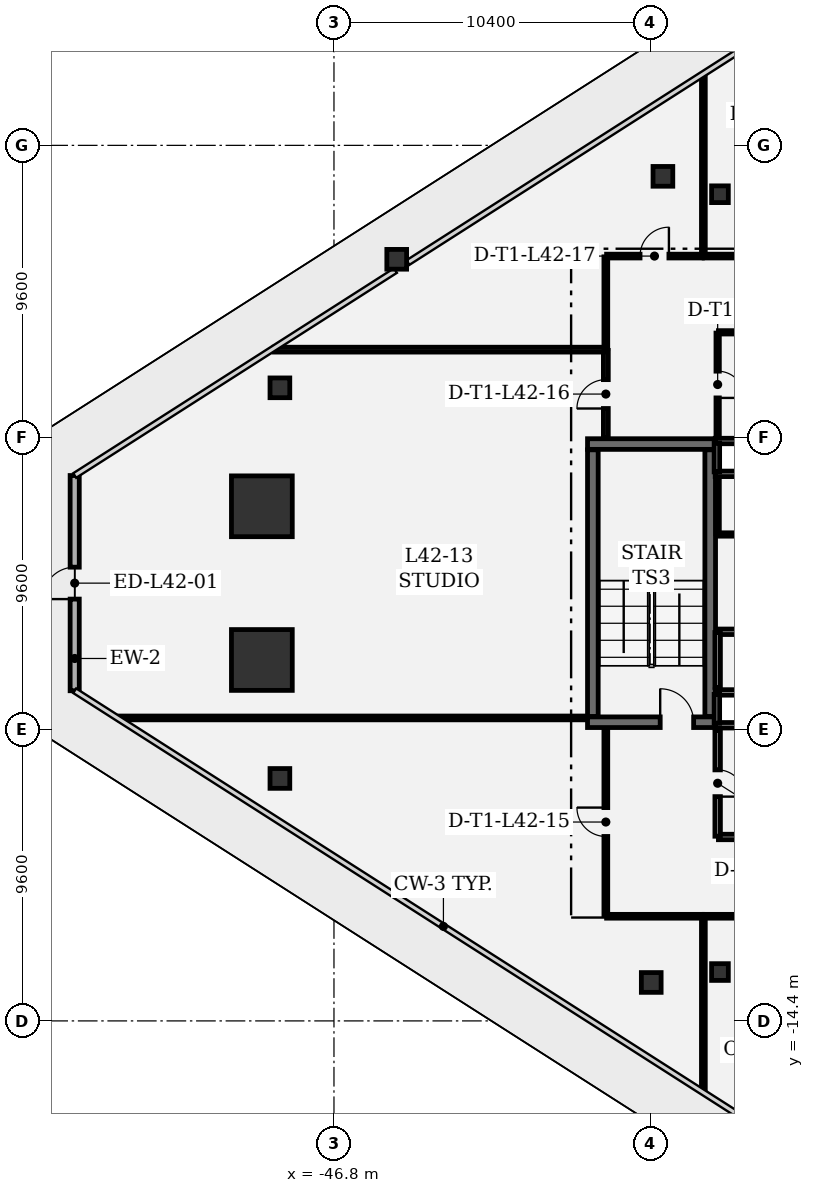
"""IFC4 building model, lengths in metres.
Left out: names, types, materials, properties, quantities, classifications, styles, units other than length and angle.
Written with IfcOpenShell. Run it as: python <this file> out.ifc"""

import sys

from ifc_helpers import new_model, si_unit, direction, frame, frame_2d, origin, origin_2d, place, context, subcontext, project, spatial, rectangle, extrude, element, fill, save


model = new_model("IFC4")
c1 = context("Model", 3, precision=1e-05, world=origin(), true_north=direction((0.0, 1.0)))
c2 = subcontext(c1, "Body", "Model", "MODEL_VIEW")
j1 = project(units=[si_unit("LENGTHUNIT", "METRE"), si_unit("PLANEANGLEUNIT", "RADIAN")], contexts=[c1])
p1 = place(None, origin())
s1 = spatial("IfcSite", under=j1, at=p1, CompositionType="ELEMENT")
p2 = place(p1, origin())
s2 = spatial("IfcBuilding", under=s1, at=p2, CompositionType="ELEMENT")
p3 = place(p2, frame((0.0, 0.0, 184.8)))
s3 = spatial("IfcBuildingStorey", under=s2, at=p3, CompositionType="ELEMENT", Elevation=184.8)
for number, where, z_axis, x_axis in (
    (1, (-49.172, 2.528, 0.0), (0.0, 0.0, 1.0), (1.0, 0.0, 0.0)),
    (2, (-49.172, -2.528, 0.0), (0.0, 0.0, 1.0), (1.0, 0.0, 0.0)),
):
    element("IfcColumn", number, at=place(p3, frame(where, z_axis=z_axis, x_axis=x_axis)), inside=s3, PredefinedType="COLUMN", context=c2, shape_type="SweptSolid", body=[
        extrude(rectangle(XDim=2.0, YDim=2.0, at=origin_2d()), origin(), (0.0, 0.0, 1.0), 4.05),
    ])
for number, where, z_axis, x_axis in (
    (3, (-44.736, 10.652, 0.0), (0.0, 0.0, 1.0), (1.0, 0.0, 0.0)),
    (4, (-48.578, 6.425, 0.0), (0.0, 0.0, 1.0), (1.0, 0.0, 0.0)),
    (5, (-48.578, -6.425, 0.0), (0.0, 0.0, 1.0), (1.0, 0.0, 0.0)),
    (6, (-35.981, 13.381, 0.0), (0.0, 0.0, 1.0), (1.0, 0.0, 0.0)),
    (7, (-36.365, -13.135, 0.0), (0.0, 0.0, 1.0), (1.0, 0.0, 0.0)),
):
    element("IfcColumn", number, at=place(p3, frame(where, z_axis=z_axis, x_axis=x_axis)), inside=s3, PredefinedType="COLUMN", context=c2, shape_type="SweptSolid", body=[
        extrude(rectangle(XDim=0.65, YDim=0.65, at=origin_2d()), origin(), (0.0, 0.0, 1.0), 4.05),
    ])
for number, where, z_axis, x_axis in (
    (8, (-34.104, 12.792, 0.0), (0.0, 0.0, 1.0), (1.0, 0.0, 0.0)),
    (9, (-34.104, -12.792, 0.0), (0.0, 0.0, 1.0), (1.0, 0.0, 0.0)),
):
    element("IfcColumn", number, at=place(p3, frame(where, z_axis=z_axis, x_axis=x_axis)), inside=s3, PredefinedType="COLUMN", context=c2, shape_type="SweptSolid", body=[
        extrude(rectangle(XDim=0.55, YDim=0.55, at=origin_2d()), origin(), (0.0, 0.0, 1.0), 4.05),
    ])
p4 = place(p3, frame((-55.328, -3.54, 0.0), z_axis=(0.0, 0.0, 1.0), x_axis=(0.0, 1.0, 0.0)))
e10 = element("IfcWall", 10, at=p4, inside=s3, PredefinedType="SOLIDWALL", context=c2, shape_type="SweptSolid", body=[
    extrude(rectangle(XDim=7.079, YDim=0.3, at=frame_2d((3.54, 0.0))), origin(), (0.0, 0.0, 1.0), 3.78),
])
p5 = place(p4, frame((3.015, 0.0, 0.0)))
e11 = element("IfcOpeningElement", 11, at=p5, cuts=e10, PredefinedType="OPENING", context=c2, shape_type="SweptSolid", body=[
    extrude(rectangle(XDim=1.05, YDim=2.2, at=frame_2d((0.525, 1.1))), frame((0.0, 0.16, 0.0), z_axis=(0.0, -1.0, 0.0), x_axis=(1.0, 0.0, 0.0)), (0.0, 0.0, 1.0), 0.32),
])
p6 = place(p3, frame((-38.46, -4.575, 0.0), z_axis=(0.0, 0.0, 1.0), x_axis=(1.0, 0.0, 0.0)))
e12 = element("IfcWall", 12, at=p6, inside=s3, PredefinedType="SHEAR", context=c2, shape_type="SweptSolid", body=[
    extrude(rectangle(XDim=4.21, YDim=0.35, at=frame_2d((2.105, 0.0))), origin(), (0.0, 0.0, 1.0), 3.78),
])
p7 = place(p6, frame((2.39, 0.0, 0.0)))
e13 = element("IfcOpeningElement", 13, at=p7, cuts=e12, PredefinedType="OPENING", context=c2, shape_type="SweptSolid", body=[
    extrude(rectangle(XDim=1.1, YDim=2.2, at=frame_2d((0.55, 1.1))), frame((0.0, 0.185, 0.0), z_axis=(0.0, -1.0, 0.0), x_axis=(1.0, 0.0, 0.0)), (0.0, 0.0, 1.0), 0.37),
])
p8 = place(p3, frame((-34.25, 4.575, 0.0), z_axis=(0.0, 0.0, 1.0), x_axis=(-1.0, 0.0, 0.0)))
e14 = element("IfcWall", 14, at=p8, inside=s3, PredefinedType="SHEAR", context=c2, shape_type="SweptSolid", body=[
    extrude(rectangle(XDim=4.21, YDim=0.35, at=frame_2d((2.105, 0.0))), origin(), (0.0, 0.0, 1.0), 3.78),
])
for number, where, z_axis, x_axis in (
    (15, (-34.425, -4.385, 0.0), (0.0, 0.0, 1.0), (0.0, 1.0, 0.0)),
    (16, (-38.285, 4.385, 0.0), (0.0, 0.0, 1.0), (0.0, -1.0, 0.0)),
):
    element("IfcWall", number, at=place(p3, frame(where, z_axis=z_axis, x_axis=x_axis)), inside=s3, PredefinedType="SHEAR", context=c2, shape_type="SweptSolid", body=[
        extrude(rectangle(XDim=8.77, YDim=0.35, at=frame_2d((4.385, 0.0))), origin(), (0.0, 0.0, 1.0), 3.78),
    ])
for number, where, z_axis, x_axis in (
    (17, (-32.99, 3.595, 0.0), (0.0, 0.0, 1.0), (-1.0, 0.0, 0.0)),
    (18, (-34.26, 4.675, 0.0), (0.0, 0.0, 1.0), (1.0, 0.0, 0.0)),
):
    element("IfcWall", number, at=place(p3, frame(where, z_axis=z_axis, x_axis=x_axis)), inside=s3, PredefinedType="PARTITIONING", context=c2, shape_type="SweptSolid", body=[
        extrude(rectangle(XDim=1.27, YDim=0.18, at=frame_2d((0.635, 0.0))), origin(), (0.0, 0.0, 1.0), 3.78),
    ])
p9 = place(p3, frame((-34.205, 3.66, 0.0), z_axis=(0.0, 0.0, 1.0), x_axis=(0.0, 1.0, 0.0)))
e19 = element("IfcWall", 19, at=p9, inside=s3, PredefinedType="PARTITIONING", context=c2, shape_type="SweptSolid", body=[
    extrude(rectangle(XDim=0.95, YDim=0.18, at=frame_2d((0.475, 0.0))), origin(), (0.0, 0.0, 1.0), 3.78),
])
for number, where, z_axis, x_axis in (
    (20, (-32.99, -4.675, 0.0), (0.0, 0.0, 1.0), (-1.0, 0.0, 0.0)),
    (21, (-34.26, -3.595, 0.0), (0.0, 0.0, 1.0), (1.0, 0.0, 0.0)),
):
    element("IfcWall", number, at=place(p3, frame(where, z_axis=z_axis, x_axis=x_axis)), inside=s3, PredefinedType="PARTITIONING", context=c2, shape_type="SweptSolid", body=[
        extrude(rectangle(XDim=1.27, YDim=0.18, at=frame_2d((0.635, 0.0))), origin(), (0.0, 0.0, 1.0), 3.78),
    ])
p10 = place(p3, frame((-34.205, -4.61, 0.0), z_axis=(0.0, 0.0, 1.0), x_axis=(0.0, 1.0, 0.0)))
e22 = element("IfcWall", 22, at=p10, inside=s3, PredefinedType="PARTITIONING", context=c2, shape_type="SweptSolid", body=[
    extrude(rectangle(XDim=0.95, YDim=0.18, at=frame_2d((0.475, 0.0))), origin(), (0.0, 0.0, 1.0), 3.78),
])
for number, where, z_axis, x_axis in (
    (23, (-34.155, 1.6, 0.0), (0.0, 0.0, 1.0), (1.0, 0.0, 0.0)),
    (24, (-30.905, 8.25, 0.0), (0.0, 0.0, 1.0), (-1.0, 0.0, 0.0)),
):
    element("IfcWall", number, at=place(p3, frame(where, z_axis=z_axis, x_axis=x_axis)), inside=s3, PredefinedType="PARTITIONING", context=c2, shape_type="SweptSolid", body=[
        extrude(rectangle(XDim=3.25, YDim=0.11, at=frame_2d((1.625, 0.0))), origin(), (0.0, 0.0, 1.0), 3.78),
    ])
p11 = place(p3, frame((-34.18, 8.225, 0.0), z_axis=(0.0, 0.0, 1.0), x_axis=(0.0, -1.0, 0.0)))
e25 = element("IfcWall", 25, at=p11, inside=s3, PredefinedType="PARTITIONING", context=c2, shape_type="SweptSolid", body=[
    extrude(rectangle(XDim=3.385, YDim=0.11, at=frame_2d((1.692, 0.0))), origin(), (0.0, 0.0, 1.0), 3.78),
])
p12 = place(p11, frame((1.252, 0.0, 0.0)))
e26 = element("IfcOpeningElement", 26, at=p12, cuts=e25, PredefinedType="OPENING", context=c2, shape_type="SweptSolid", body=[
    extrude(rectangle(XDim=0.88, YDim=2.1, at=frame_2d((0.44, 1.05))), frame((0.0, 0.065, 0.0), z_axis=(0.0, -1.0, 0.0), x_axis=(1.0, 0.0, 0.0)), (0.0, 0.0, 1.0), 0.13),
])
p13 = place(p3, frame((-34.18, 3.43, 0.0), z_axis=(0.0, 0.0, 1.0), x_axis=(0.0, -1.0, 0.0)))
e27 = element("IfcWall", 27, at=p13, inside=s3, PredefinedType="PARTITIONING", context=c2, shape_type="SweptSolid", body=[
    extrude(rectangle(XDim=1.805, YDim=0.11, at=frame_2d((0.902, 0.0))), origin(), (0.0, 0.0, 1.0), 3.78),
])
p14 = place(p3, frame((-34.155, -8.35, 0.0), z_axis=(0.0, 0.0, 1.0), x_axis=(1.0, 0.0, 0.0)))
e28 = element("IfcWall", 28, at=p14, inside=s3, PredefinedType="PARTITIONING", context=c2, shape_type="SweptSolid", body=[
    extrude(rectangle(XDim=3.25, YDim=0.18, at=frame_2d((1.625, 0.0))), origin(), (0.0, 0.0, 1.0), 3.344),
])
p15 = place(p3, frame((-30.905, -1.6, 0.0), z_axis=(0.0, 0.0, 1.0), x_axis=(-1.0, 0.0, 0.0)))
e29 = element("IfcWall", 29, at=p15, inside=s3, PredefinedType="PARTITIONING", context=c2, shape_type="SweptSolid", body=[
    extrude(rectangle(XDim=3.25, YDim=0.18, at=frame_2d((1.625, 0.0))), origin(), (0.0, 0.0, 1.0), 3.78),
])
p16 = place(p3, frame((-34.18, -1.625, 0.0), z_axis=(0.0, 0.0, 1.0), x_axis=(0.0, -1.0, 0.0)))
e30 = element("IfcWall", 30, at=p16, inside=s3, PredefinedType="PARTITIONING", context=c2, shape_type="SweptSolid", body=[
    extrude(rectangle(XDim=1.805, YDim=0.18, at=frame_2d((0.902, 0.0))), origin(), (0.0, 0.0, 1.0), 3.78),
])
p17 = place(p3, frame((-34.18, -4.84, 0.0), z_axis=(0.0, 0.0, 1.0), x_axis=(0.0, -1.0, 0.0)))
e31 = element("IfcWall", 31, at=p17, inside=s3, PredefinedType="PARTITIONING", context=c2, shape_type="SweptSolid", body=[
    extrude(rectangle(XDim=3.485, YDim=0.18, at=frame_2d((1.743, 0.0))), origin(), (0.0, 0.0, 1.0), 3.78),
])
p18 = place(p17, frame((1.302, 0.0, 0.0)))
e32 = element("IfcOpeningElement", 32, at=p18, cuts=e31, PredefinedType="OPENING", context=c2, shape_type="SweptSolid", body=[
    extrude(rectangle(XDim=0.88, YDim=2.1, at=frame_2d((0.44, 1.05))), frame((0.0, 0.1, 0.0), z_axis=(0.0, -1.0, 0.0), x_axis=(1.0, 0.0, 0.0)), (0.0, 0.0, 1.0), 0.2),
])
p19 = place(p3, frame((-34.625, 10.758, 0.0), z_axis=(0.0, 0.0, 1.0), x_axis=(1.0, 0.0, 0.0)))
e33 = element("IfcWall", 33, at=p19, inside=s3, PredefinedType="PARTITIONING", context=c2, shape_type="SweptSolid", body=[
    extrude(rectangle(XDim=6.43, YDim=0.125, at=frame_2d((3.215, 0.0))), origin(), (0.0, 0.0, 1.0), 2.9),
])
p20 = place(p19, frame((2.74, 0.0, 0.0)))
e34 = element("IfcOpeningElement", 34, at=p20, cuts=e33, PredefinedType="OPENING", context=c2, shape_type="SweptSolid", body=[
    extrude(rectangle(XDim=0.95, YDim=2.15, at=frame_2d((0.475, 1.075))), frame((0.0, 0.073, 0.0), z_axis=(0.0, -1.0, 0.0), x_axis=(1.0, 0.0, 0.0)), (0.0, 0.0, 1.0), 0.145),
])
p21 = place(p3, frame((-34.65, 16.676, 0.0), z_axis=(0.0, 0.0, 1.0), x_axis=(0.0, -1.0, 0.0)))
e35 = element("IfcWall", 35, at=p21, inside=s3, PredefinedType="PARTITIONING", context=c2, shape_type="SweptSolid", body=[
    extrude(rectangle(XDim=5.892, YDim=0.125, at=frame_2d((2.946, 0.0))), origin(), (0.0, 0.0, 1.0), 3.78),
])
p22 = place(p3, frame((-29.963, -10.958, 0.0), z_axis=(0.0, 0.0, 1.0), x_axis=(-1.0, 0.0, 0.0)))
e36 = element("IfcWall", 36, at=p22, inside=s3, PredefinedType="PARTITIONING", context=c2, shape_type="SweptSolid", body=[
    extrude(rectangle(XDim=4.662, YDim=0.125, at=frame_2d((2.331, 0.0))), origin(), (0.0, 0.0, 1.0), 2.9),
])
p23 = place(p22, frame((1.856, 0.0, 0.0)))
e37 = element("IfcOpeningElement", 37, at=p23, cuts=e36, PredefinedType="OPENING", context=c2, shape_type="SweptSolid", body=[
    extrude(rectangle(XDim=0.95, YDim=2.15, at=frame_2d((0.475, 1.075))), frame((0.0, 0.073, 0.0), z_axis=(0.0, -1.0, 0.0), x_axis=(1.0, 0.0, 0.0)), (0.0, 0.0, 1.0), 0.145),
])
p24 = place(p3, frame((-34.65, -10.983, 0.0), z_axis=(0.0, 0.0, 1.0), x_axis=(0.0, -1.0, 0.0)))
e38 = element("IfcWall", 38, at=p24, inside=s3, PredefinedType="PARTITIONING", context=c2, shape_type="SweptSolid", body=[
    extrude(rectangle(XDim=5.693, YDim=0.125, at=frame_2d((2.846, 0.0))), origin(), (0.0, 0.0, 1.0), 3.78),
])
p25 = place(p3, frame((-37.833, -10.958, 0.0), z_axis=(0.0, 0.0, 1.0), x_axis=(1.0, 0.0, 0.0)))
e39 = element("IfcWall", 39, at=p25, inside=s3, PredefinedType="PARTITIONING", context=c2, shape_type="SweptSolid", body=[
    extrude(rectangle(XDim=3.15, YDim=0.125, at=frame_2d((1.575, 0.0))), origin(), (0.0, 0.0, 1.0), 2.9),
])
p26 = place(p3, frame((-37.858, -10.933, 0.0), z_axis=(0.0, 0.0, 1.0), x_axis=(0.0, 1.0, 0.0)))
e40 = element("IfcWall", 40, at=p26, inside=s3, PredefinedType="PARTITIONING", context=c2, shape_type="SweptSolid", body=[
    extrude(rectangle(XDim=6.15, YDim=0.125, at=frame_2d((3.075, 0.0))), origin(), (0.0, 0.0, 1.0), 3.78),
])
p27 = place(p26, frame((2.6, 0.0, 0.0)))
e41 = element("IfcOpeningElement", 41, at=p27, cuts=e40, PredefinedType="OPENING", context=c2, shape_type="SweptSolid", body=[
    extrude(rectangle(XDim=0.95, YDim=2.15, at=frame_2d((0.475, 1.075))), frame((0.0, 0.073, 0.0), z_axis=(0.0, -1.0, 0.0), x_axis=(1.0, 0.0, 0.0)), (0.0, 0.0, 1.0), 0.145),
])
p28 = place(p3, frame((-38.493, -4.434, 0.0), z_axis=(0.0, 0.0, 1.0), x_axis=(-1.0, 0.0, 0.0)))
e42 = element("IfcWall", 42, at=p28, inside=s3, PredefinedType="PARTITIONING", context=c2, shape_type="SweptSolid", body=[
    extrude(rectangle(XDim=15.355, YDim=0.125, at=frame_2d((7.678, 0.0))), origin(), (0.0, 0.0, 1.0), 2.9),
])
p29 = place(p3, frame((-37.858, 4.783, 0.0), z_axis=(0.0, 0.0, 1.0), x_axis=(0.0, 1.0, 0.0)))
e43 = element("IfcWall", 43, at=p29, inside=s3, PredefinedType="PARTITIONING", context=c2, shape_type="SweptSolid", body=[
    extrude(rectangle(XDim=2.872, YDim=0.16, at=frame_2d((1.436, 0.0))), origin(), (0.0, 0.0, 1.0), 3.78),
])
p30 = place(p29, frame((0.961, 0.0, 0.0)))
e44 = element("IfcOpeningElement", 44, at=p30, cuts=e43, PredefinedType="OPENING", context=c2, shape_type="SweptSolid", body=[
    extrude(rectangle(XDim=0.95, YDim=2.15, at=frame_2d((0.475, 1.075))), frame((0.0, 0.09, 0.0), z_axis=(0.0, -1.0, 0.0), x_axis=(1.0, 0.0, 0.0)), (0.0, 0.0, 1.0), 0.18),
])
p31 = place(p3, frame((-37.883, 7.68, 0.0), z_axis=(0.0, 0.0, 1.0), x_axis=(-1.0, 0.0, 0.0)))
e45 = element("IfcWall", 45, at=p31, inside=s3, PredefinedType="PARTITIONING", context=c2, shape_type="SweptSolid", body=[
    extrude(rectangle(XDim=10.886, YDim=0.16, at=frame_2d((5.443, 0.0))), origin(), (0.0, 0.0, 1.0), 2.9),
])
p32 = place(p3, frame((-37.858, 7.713, 0.0), z_axis=(0.0, 0.0, 1.0), x_axis=(0.0, 1.0, 0.0)))
e46 = element("IfcWall", 46, at=p32, inside=s3, PredefinedType="PARTITIONING", context=c2, shape_type="SweptSolid", body=[
    extrude(rectangle(XDim=3.02, YDim=0.125, at=frame_2d((1.51, 0.0))), origin(), (0.0, 0.0, 1.0), 3.78),
])
p33 = place(p3, frame((-37.833, 10.758, 0.0), z_axis=(0.0, 0.0, 1.0), x_axis=(1.0, 0.0, 0.0)))
e47 = element("IfcWall", 47, at=p33, inside=s3, PredefinedType="PARTITIONING", context=c2, shape_type="SweptSolid", body=[
    extrude(rectangle(XDim=3.15, YDim=0.125, at=frame_2d((1.575, 0.0))), origin(), (0.0, 0.0, 1.0), 2.9),
])
p34 = place(p33, frame((1.1, 0.0, 0.0)))
e48 = element("IfcOpeningElement", 48, at=p34, cuts=e47, PredefinedType="OPENING", context=c2, shape_type="SweptSolid", body=[
    extrude(rectangle(XDim=0.95, YDim=2.15, at=frame_2d((0.475, 1.075))), frame((0.0, 0.073, 0.0), z_axis=(0.0, -1.0, 0.0), x_axis=(1.0, 0.0, 0.0)), (0.0, 0.0, 1.0), 0.145),
])
p35 = place(p5, origin())
e49 = element("IfcDoor", 49, at=p35, inside=s3, OperationType="SINGLE_SWING_LEFT", PredefinedType="DOOR", context=c2, shape_type="SweptSolid", body=[
    extrude(rectangle(XDim=1.05, YDim=2.2, at=frame_2d((0.525, 1.1))), frame((0.0, 0.025, 0.0), z_axis=(0.0, -1.0, 0.0), x_axis=(1.0, 0.0, 0.0)), (0.0, 0.0, 1.0), 0.05),
])
fill(e11, e49)
p36 = place(p7, origin())
e50 = element("IfcDoor", 50, at=p36, inside=s3, OperationType="SINGLE_SWING_LEFT", PredefinedType="DOOR", context=c2, shape_type="SweptSolid", body=[
    extrude(rectangle(XDim=1.1, YDim=2.2, at=frame_2d((0.55, 1.1))), frame((0.0, 0.025, 0.0), z_axis=(0.0, -1.0, 0.0), x_axis=(1.0, 0.0, 0.0)), (0.0, 0.0, 1.0), 0.05),
])
fill(e13, e50)
p37 = place(p12, origin())
e51 = element("IfcDoor", 51, at=p37, inside=s3, OperationType="SINGLE_SWING_RIGHT", PredefinedType="DOOR", context=c2, shape_type="SweptSolid", body=[
    extrude(rectangle(XDim=0.88, YDim=2.1, at=frame_2d((0.44, 1.05))), frame((0.0, 0.025, 0.0), z_axis=(0.0, -1.0, 0.0), x_axis=(1.0, 0.0, 0.0)), (0.0, 0.0, 1.0), 0.05),
])
fill(e26, e51)
p38 = place(p18, origin())
e52 = element("IfcDoor", 52, at=p38, inside=s3, OperationType="SINGLE_SWING_RIGHT", PredefinedType="DOOR", context=c2, shape_type="SweptSolid", body=[
    extrude(rectangle(XDim=0.88, YDim=2.1, at=frame_2d((0.44, 1.05))), frame((0.0, 0.025, 0.0), z_axis=(0.0, -1.0, 0.0), x_axis=(1.0, 0.0, 0.0)), (0.0, 0.0, 1.0), 0.05),
])
fill(e32, e52)
p39 = place(p27, origin())
e53 = element("IfcDoor", 53, at=p39, inside=s3, OperationType="SINGLE_SWING_RIGHT", PredefinedType="DOOR", context=c2, shape_type="SweptSolid", body=[
    extrude(rectangle(XDim=0.95, YDim=2.15, at=frame_2d((0.475, 1.075))), frame((0.0, 0.025, 0.0), z_axis=(0.0, -1.0, 0.0), x_axis=(1.0, 0.0, 0.0)), (0.0, 0.0, 1.0), 0.05),
])
fill(e41, e53)
p40 = place(p30, origin())
e54 = element("IfcDoor", 54, at=p40, inside=s3, OperationType="SINGLE_SWING_LEFT", PredefinedType="DOOR", context=c2, shape_type="SweptSolid", body=[
    extrude(rectangle(XDim=0.95, YDim=2.15, at=frame_2d((0.475, 1.075))), frame((0.0, 0.025, 0.0), z_axis=(0.0, -1.0, 0.0), x_axis=(1.0, 0.0, 0.0)), (0.0, 0.0, 1.0), 0.05),
])
fill(e44, e54)
p41 = place(p34, origin())
e55 = element("IfcDoor", 55, at=p41, inside=s3, OperationType="SINGLE_SWING_RIGHT", PredefinedType="DOOR", context=c2, shape_type="SweptSolid", body=[
    extrude(rectangle(XDim=0.95, YDim=2.15, at=frame_2d((0.475, 1.075))), frame((0.0, 0.025, 0.0), z_axis=(0.0, -1.0, 0.0), x_axis=(1.0, 0.0, 0.0)), (0.0, 0.0, 1.0), 0.05),
])
fill(e48, e55)
save(model, sys.argv[1])
